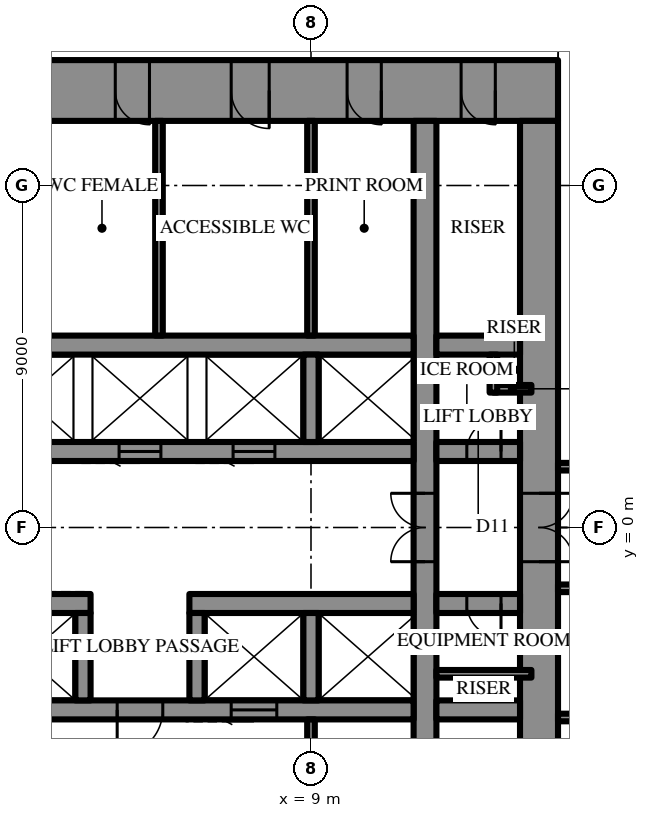
"""IFC4 building model, lengths in metres.
Left out: names, types, materials, properties, quantities, classifications, styles, units other than length and angle.
Written with IfcOpenShell. Run it as: python <this file> out.ifc"""

import sys

from ifc_helpers import new_model, si_unit, direction, frame, frame_2d, origin, place, context, subcontext, project, spatial, rectangle, extrude, element, fill, save


model = new_model("IFC4")
c1 = context("Model", 3, precision=1e-05, world=origin(), true_north=direction((0.0, 1.0)))
c2 = subcontext(c1, "Body", "Model", "MODEL_VIEW")
j1 = project(units=[si_unit("LENGTHUNIT", "METRE"), si_unit("PLANEANGLEUNIT", "RADIAN")], contexts=[c1])
p1 = place(None, origin())
s1 = spatial("IfcSite", under=j1, at=p1, CompositionType="ELEMENT")
p2 = place(p1, origin())
s2 = spatial("IfcBuilding", under=s1, at=p2, CompositionType="ELEMENT")
p3 = place(p2, frame((0.0, 0.0, 232.3)))
s3 = spatial("IfcBuildingStorey", under=s2, at=p3, CompositionType="ELEMENT", Elevation=232.3)
p4 = place(p3, frame((-15.5, 11.5, 0.0), z_axis=(0.0, 0.0, 1.0), x_axis=(1.0, 0.0, 0.0)))
e1 = element("IfcWall", 1, at=p4, inside=s3, PredefinedType="SHEAR", context=c2, shape_type="SweptSolid", body=[
    extrude(rectangle(XDim=31.0, YDim=1.6, at=frame_2d((15.5, 0.0))), origin(), (0.0, 0.0, 1.0), 4.2),
])
p5 = place(p4, frame((16.35, 0.0, 0.0)))
e2 = element("IfcOpeningElement", 2, at=p5, cuts=e1, PredefinedType="OPENING", context=c2, shape_type="SweptSolid", body=[
    extrude(rectangle(XDim=0.9, YDim=2.2, at=frame_2d((0.45, 1.1))), frame((0.0, 0.81, 0.0), z_axis=(0.0, -1.0, 0.0), x_axis=(1.0, 0.0, 0.0)), (0.0, 0.0, 1.0), 1.62),
])
p6 = place(p4, frame((19.35, 0.0, 0.0)))
e3 = element("IfcOpeningElement", 3, at=p6, cuts=e1, PredefinedType="OPENING", context=c2, shape_type="SweptSolid", body=[
    extrude(rectangle(XDim=0.9, YDim=2.2, at=frame_2d((0.45, 1.1))), frame((0.0, 0.81, 0.0), z_axis=(0.0, -1.0, 0.0), x_axis=(1.0, 0.0, 0.0)), (0.0, 0.0, 1.0), 1.62),
])
p7 = place(p4, frame((22.4, 0.0, 0.0)))
e4 = element("IfcOpeningElement", 4, at=p7, cuts=e1, PredefinedType="OPENING", context=c2, shape_type="SweptSolid", body=[
    extrude(rectangle(XDim=1.0, YDim=2.2, at=frame_2d((0.5, 1.1))), frame((0.0, 0.81, 0.0), z_axis=(0.0, -1.0, 0.0), x_axis=(1.0, 0.0, 0.0)), (0.0, 0.0, 1.0), 1.62),
])
p8 = place(p4, frame((1.65, 0.0, 0.0)))
e5 = element("IfcOpeningElement", 5, at=p8, cuts=e1, PredefinedType="OPENING", context=c2, shape_type="SweptSolid", body=[
    extrude(rectangle(XDim=0.9, YDim=2.2, at=frame_2d((0.45, 1.1))), frame((0.0, 0.81, 0.0), z_axis=(0.0, -1.0, 0.0), x_axis=(1.0, 0.0, 0.0)), (0.0, 0.0, 1.0), 1.62),
])
p9 = place(p4, frame((4.65, 0.0, 0.0)))
e6 = element("IfcOpeningElement", 6, at=p9, cuts=e1, PredefinedType="OPENING", context=c2, shape_type="SweptSolid", body=[
    extrude(rectangle(XDim=0.9, YDim=2.2, at=frame_2d((0.45, 1.1))), frame((0.0, 0.81, 0.0), z_axis=(0.0, -1.0, 0.0), x_axis=(1.0, 0.0, 0.0)), (0.0, 0.0, 1.0), 1.62),
])
p10 = place(p4, frame((25.45, 0.0, 0.0)))
e7 = element("IfcOpeningElement", 7, at=p10, cuts=e1, PredefinedType="OPENING", context=c2, shape_type="SweptSolid", body=[
    extrude(rectangle(XDim=0.9, YDim=2.2, at=frame_2d((0.45, 1.1))), frame((0.0, 0.81, 0.0), z_axis=(0.0, -1.0, 0.0), x_axis=(1.0, 0.0, 0.0)), (0.0, 0.0, 1.0), 1.62),
])
p11 = place(p4, frame((28.45, 0.0, 0.0)))
e8 = element("IfcOpeningElement", 8, at=p11, cuts=e1, PredefinedType="OPENING", context=c2, shape_type="SweptSolid", body=[
    extrude(rectangle(XDim=0.9, YDim=2.2, at=frame_2d((0.45, 1.1))), frame((0.0, 0.81, 0.0), z_axis=(0.0, -1.0, 0.0), x_axis=(1.0, 0.0, 0.0)), (0.0, 0.0, 1.0), 1.62),
])
p12 = place(p3, frame((15.0, -10.7, 0.0), z_axis=(0.0, 0.0, 1.0), x_axis=(0.0, 1.0, 0.0)))
e9 = element("IfcWall", 9, at=p12, inside=s3, PredefinedType="SHEAR", context=c2, shape_type="SweptSolid", body=[
    extrude(rectangle(XDim=21.4, YDim=1.0, at=frame_2d((10.7, 0.0))), origin(), (0.0, 0.0, 1.0), 4.2),
])
p13 = place(p12, frame((9.8, 0.0, 0.0)))
e10 = element("IfcOpeningElement", 10, at=p13, cuts=e9, PredefinedType="OPENING", context=c2, shape_type="SweptSolid", body=[
    extrude(rectangle(XDim=1.8, YDim=2.4, at=frame_2d((0.9, 1.2))), frame((0.0, 0.51, 0.0), z_axis=(0.0, -1.0, 0.0), x_axis=(1.0, 0.0, 0.0)), (0.0, 0.0, 1.0), 1.02),
])
p14 = place(p3, frame((12.0, -10.7, 0.0), z_axis=(0.0, 0.0, 1.0), x_axis=(0.0, 1.0, 0.0)))
e11 = element("IfcWall", 11, at=p14, inside=s3, PredefinedType="SHEAR", context=c2, shape_type="SweptSolid", body=[
    extrude(rectangle(XDim=21.4, YDim=0.6, at=frame_2d((10.7, 0.0))), origin(), (0.0, 0.0, 1.0), 4.2),
])
p15 = place(p14, frame((9.8, 0.0, 0.0)))
e12 = element("IfcOpeningElement", 12, at=p15, cuts=e11, PredefinedType="OPENING", context=c2, shape_type="SweptSolid", body=[
    extrude(rectangle(XDim=1.8, YDim=2.4, at=frame_2d((0.9, 1.2))), frame((0.0, 0.31, 0.0), z_axis=(0.0, -1.0, 0.0), x_axis=(1.0, 0.0, 0.0)), (0.0, 0.0, 1.0), 0.62),
])
p16 = place(p3, frame((-3.2, 2.0, 0.0), z_axis=(0.0, 0.0, 1.0), x_axis=(1.0, 0.0, 0.0)))
e13 = element("IfcWall", 13, at=p16, inside=s3, PredefinedType="SHEAR", context=c2, shape_type="SweptSolid", body=[
    extrude(rectangle(XDim=14.9, YDim=0.5, at=frame_2d((7.45, 0.0))), origin(), (0.0, 0.0, 1.0), 4.2),
])
p17 = place(p16, frame((1.15, 0.0, 0.0)))
e14 = element("IfcOpeningElement", 14, at=p17, cuts=e13, PredefinedType="OPENING", context=c2, shape_type="SweptSolid", body=[
    extrude(rectangle(XDim=1.1, YDim=2.2, at=frame_2d((0.55, 1.1))), frame((0.0, 0.26, 0.0), z_axis=(0.0, -1.0, 0.0), x_axis=(1.0, 0.0, 0.0)), (0.0, 0.0, 1.0), 0.52),
])
p18 = place(p16, frame((4.15, 0.0, 0.0)))
e15 = element("IfcOpeningElement", 15, at=p18, cuts=e13, PredefinedType="OPENING", context=c2, shape_type="SweptSolid", body=[
    extrude(rectangle(XDim=1.1, YDim=2.2, at=frame_2d((0.55, 1.1))), frame((0.0, 0.26, 0.0), z_axis=(0.0, -1.0, 0.0), x_axis=(1.0, 0.0, 0.0)), (0.0, 0.0, 1.0), 0.52),
])
p19 = place(p16, frame((7.15, 0.0, 0.0)))
e16 = element("IfcOpeningElement", 16, at=p19, cuts=e13, PredefinedType="OPENING", context=c2, shape_type="SweptSolid", body=[
    extrude(rectangle(XDim=1.1, YDim=2.2, at=frame_2d((0.55, 1.1))), frame((0.0, 0.26, 0.0), z_axis=(0.0, -1.0, 0.0), x_axis=(1.0, 0.0, 0.0)), (0.0, 0.0, 1.0), 0.52),
])
p20 = place(p16, frame((10.15, 0.0, 0.0)))
e17 = element("IfcOpeningElement", 17, at=p20, cuts=e13, PredefinedType="OPENING", context=c2, shape_type="SweptSolid", body=[
    extrude(rectangle(XDim=1.1, YDim=2.2, at=frame_2d((0.55, 1.1))), frame((0.0, 0.26, 0.0), z_axis=(0.0, -1.0, 0.0), x_axis=(1.0, 0.0, 0.0)), (0.0, 0.0, 1.0), 0.52),
])
p21 = place(p3, frame((12.3, 2.0, 0.0), z_axis=(0.0, 0.0, 1.0), x_axis=(1.0, 0.0, 0.0)))
e18 = element("IfcWall", 18, at=p21, inside=s3, PredefinedType="SHEAR", context=c2, shape_type="SweptSolid", body=[
    extrude(rectangle(XDim=2.2, YDim=0.5, at=frame_2d((1.1, 0.0))), origin(), (0.0, 0.0, 1.0), 4.2),
])
p22 = place(p21, frame((0.8, 0.0, 0.0)))
e19 = element("IfcOpeningElement", 19, at=p22, cuts=e18, PredefinedType="OPENING", context=c2, shape_type="SweptSolid", body=[
    extrude(rectangle(XDim=0.9, YDim=2.2, at=frame_2d((0.45, 1.1))), frame((0.0, 0.26, 0.0), z_axis=(0.0, -1.0, 0.0), x_axis=(1.0, 0.0, 0.0)), (0.0, 0.0, 1.0), 0.52),
])
p23 = place(p3, frame((-11.7, 4.8, 0.0), z_axis=(0.0, 0.0, 1.0), x_axis=(1.0, 0.0, 0.0)))
e20 = element("IfcWall", 20, at=p23, inside=s3, PredefinedType="SHEAR", context=c2, shape_type="SweptSolid", body=[
    extrude(rectangle(XDim=23.4, YDim=0.5, at=frame_2d((11.7, 0.0))), origin(), (0.0, 0.0, 1.0), 4.2),
])
p24 = place(p23, frame((6.6, 0.0, 0.0)))
e21 = element("IfcOpeningElement", 21, at=p24, cuts=e20, PredefinedType="OPENING", context=c2, shape_type="SweptSolid", body=[
    extrude(rectangle(XDim=1.2, YDim=2.2, at=frame_2d((0.6, 1.1))), frame((0.0, 0.26, 0.0), z_axis=(0.0, -1.0, 0.0), x_axis=(1.0, 0.0, 0.0)), (0.0, 0.0, 1.0), 0.52),
])
p25 = place(p23, frame((3.6, 0.0, 0.0)))
e22 = element("IfcOpeningElement", 22, at=p25, cuts=e20, PredefinedType="OPENING", context=c2, shape_type="SweptSolid", body=[
    extrude(rectangle(XDim=1.2, YDim=2.2, at=frame_2d((0.6, 1.1))), frame((0.0, 0.26, 0.0), z_axis=(0.0, -1.0, 0.0), x_axis=(1.0, 0.0, 0.0)), (0.0, 0.0, 1.0), 0.52),
])
p26 = place(p3, frame((12.3, 4.8, 0.0), z_axis=(0.0, 0.0, 1.0), x_axis=(1.0, 0.0, 0.0)))
e23 = element("IfcWall", 23, at=p26, inside=s3, PredefinedType="SHEAR", context=c2, shape_type="SweptSolid", body=[
    extrude(rectangle(XDim=2.2, YDim=0.5, at=frame_2d((1.1, 0.0))), origin(), (0.0, 0.0, 1.0), 4.2),
])
p27 = place(p3, frame((9.0, 2.25, 0.0), z_axis=(0.0, 0.0, 1.0), x_axis=(0.0, 1.0, 0.0)))
e24 = element("IfcWall", 24, at=p27, inside=s3, PredefinedType="SHEAR", context=c2, shape_type="SweptSolid", body=[
    extrude(rectangle(XDim=2.3, YDim=0.4, at=frame_2d((1.15, 0.0))), origin(), (0.0, 0.0, 1.0), 4.2),
])
p28 = place(p3, frame((14.5, -2.0, 0.0), z_axis=(0.0, 0.0, 1.0), x_axis=(-1.0, 0.0, 0.0)))
e25 = element("IfcWall", 25, at=p28, inside=s3, PredefinedType="SHEAR", context=c2, shape_type="SweptSolid", body=[
    extrude(rectangle(XDim=2.2, YDim=0.5, at=frame_2d((1.1, 0.0))), origin(), (0.0, 0.0, 1.0), 4.2),
])
p29 = place(p28, frame((0.5, 0.0, 0.0)))
e26 = element("IfcOpeningElement", 26, at=p29, cuts=e25, PredefinedType="OPENING", context=c2, shape_type="SweptSolid", body=[
    extrude(rectangle(XDim=0.9, YDim=2.2, at=frame_2d((0.45, 1.1))), frame((0.0, 0.26, 0.0), z_axis=(0.0, -1.0, 0.0), x_axis=(1.0, 0.0, 0.0)), (0.0, 0.0, 1.0), 0.52),
])
p30 = place(p3, frame((11.7, -2.0, 0.0), z_axis=(0.0, 0.0, 1.0), x_axis=(-1.0, 0.0, 0.0)))
e27 = element("IfcWall", 27, at=p30, inside=s3, PredefinedType="SHEAR", context=c2, shape_type="SweptSolid", body=[
    extrude(rectangle(XDim=5.9, YDim=0.5, at=frame_2d((2.95, 0.0))), origin(), (0.0, 0.0, 1.0), 4.2),
])
p31 = place(p3, frame((3.2, -2.0, 0.0), z_axis=(0.0, 0.0, 1.0), x_axis=(-1.0, 0.0, 0.0)))
e28 = element("IfcWall", 28, at=p31, inside=s3, PredefinedType="SHEAR", context=c2, shape_type="SweptSolid", body=[
    extrude(rectangle(XDim=14.9, YDim=0.5, at=frame_2d((7.45, 0.0))), origin(), (0.0, 0.0, 1.0), 4.2),
])
p32 = place(p31, frame((1.15, 0.0, 0.0)))
e29 = element("IfcOpeningElement", 29, at=p32, cuts=e28, PredefinedType="OPENING", context=c2, shape_type="SweptSolid", body=[
    extrude(rectangle(XDim=1.1, YDim=2.2, at=frame_2d((0.55, 1.1))), frame((0.0, 0.26, 0.0), z_axis=(0.0, -1.0, 0.0), x_axis=(1.0, 0.0, 0.0)), (0.0, 0.0, 1.0), 0.52),
])
p33 = place(p31, frame((4.15, 0.0, 0.0)))
e30 = element("IfcOpeningElement", 30, at=p33, cuts=e28, PredefinedType="OPENING", context=c2, shape_type="SweptSolid", body=[
    extrude(rectangle(XDim=1.1, YDim=2.2, at=frame_2d((0.55, 1.1))), frame((0.0, 0.26, 0.0), z_axis=(0.0, -1.0, 0.0), x_axis=(1.0, 0.0, 0.0)), (0.0, 0.0, 1.0), 0.52),
])
p34 = place(p31, frame((7.15, 0.0, 0.0)))
e31 = element("IfcOpeningElement", 31, at=p34, cuts=e28, PredefinedType="OPENING", context=c2, shape_type="SweptSolid", body=[
    extrude(rectangle(XDim=1.1, YDim=2.2, at=frame_2d((0.55, 1.1))), frame((0.0, 0.26, 0.0), z_axis=(0.0, -1.0, 0.0), x_axis=(1.0, 0.0, 0.0)), (0.0, 0.0, 1.0), 0.52),
])
p35 = place(p31, frame((10.15, 0.0, 0.0)))
e32 = element("IfcOpeningElement", 32, at=p35, cuts=e28, PredefinedType="OPENING", context=c2, shape_type="SweptSolid", body=[
    extrude(rectangle(XDim=1.1, YDim=2.2, at=frame_2d((0.55, 1.1))), frame((0.0, 0.26, 0.0), z_axis=(0.0, -1.0, 0.0), x_axis=(1.0, 0.0, 0.0)), (0.0, 0.0, 1.0), 0.52),
])
p36 = place(p3, frame((14.5, -4.8, 0.0), z_axis=(0.0, 0.0, 1.0), x_axis=(-1.0, 0.0, 0.0)))
e33 = element("IfcWall", 33, at=p36, inside=s3, PredefinedType="SHEAR", context=c2, shape_type="SweptSolid", body=[
    extrude(rectangle(XDim=2.2, YDim=0.5, at=frame_2d((1.1, 0.0))), origin(), (0.0, 0.0, 1.0), 4.2),
])
p37 = place(p3, frame((11.7, -4.8, 0.0), z_axis=(0.0, 0.0, 1.0), x_axis=(-1.0, 0.0, 0.0)))
e34 = element("IfcWall", 34, at=p37, inside=s3, PredefinedType="SHEAR", context=c2, shape_type="SweptSolid", body=[
    extrude(rectangle(XDim=23.4, YDim=0.5, at=frame_2d((11.7, 0.0))), origin(), (0.0, 0.0, 1.0), 4.2),
])
p38 = place(p37, frame((6.6, 0.0, 0.0)))
e35 = element("IfcOpeningElement", 35, at=p38, cuts=e34, PredefinedType="OPENING", context=c2, shape_type="SweptSolid", body=[
    extrude(rectangle(XDim=1.2, YDim=2.2, at=frame_2d((0.6, 1.1))), frame((0.0, 0.26, 0.0), z_axis=(0.0, -1.0, 0.0), x_axis=(1.0, 0.0, 0.0)), (0.0, 0.0, 1.0), 0.52),
])
p39 = place(p37, frame((3.6, 0.0, 0.0)))
e36 = element("IfcOpeningElement", 36, at=p39, cuts=e34, PredefinedType="OPENING", context=c2, shape_type="SweptSolid", body=[
    extrude(rectangle(XDim=1.2, YDim=2.2, at=frame_2d((0.6, 1.1))), frame((0.0, 0.26, 0.0), z_axis=(0.0, -1.0, 0.0), x_axis=(1.0, 0.0, 0.0)), (0.0, 0.0, 1.0), 0.52),
])
for number, where, z_axis, x_axis in (
    (37, (9.0, -2.25, 0.0), (0.0, 0.0, 1.0), (0.0, -1.0, 0.0)),
    (38, (6.0, -2.25, 0.0), (0.0, 0.0, 1.0), (0.0, -1.0, 0.0)),
    (39, (3.0, -2.25, 0.0), (0.0, 0.0, 1.0), (0.0, -1.0, 0.0)),
):
    element("IfcWall", number, at=place(p3, frame(where, z_axis=z_axis, x_axis=x_axis)), inside=s3, PredefinedType="SHEAR", context=c2, shape_type="SweptSolid", body=[
        extrude(rectangle(XDim=2.3, YDim=0.4, at=frame_2d((1.15, 0.0))), origin(), (0.0, 0.0, 1.0), 4.2),
    ])
for number, where, z_axis, x_axis in (
    (40, (9.0, 5.05, 0.0), (0.0, 0.0, 1.0), (0.0, 1.0, 0.0)),
    (41, (5.0, 5.05, 0.0), (0.0, 0.0, 1.0), (0.0, 1.0, 0.0)),
    (42, (9.0, -5.05, 0.0), (0.0, 0.0, 1.0), (0.0, -1.0, 0.0)),
):
    element("IfcWall", number, at=place(p3, frame(where, z_axis=z_axis, x_axis=x_axis)), inside=s3, PredefinedType="PARTITIONING", context=c2, shape_type="SweptSolid", body=[
        extrude(rectangle(XDim=5.65, YDim=0.2, at=frame_2d((2.825, 0.0))), origin(), (0.0, 0.0, 1.0), 4.0),
    ])
for number, where, z_axis, x_axis in (
    (43, (13.8, 3.65, 0.0), (0.0, 0.0, 1.0), (1.0, 0.0, 0.0)),
    (44, (13.8, 3.55, 0.0), (0.0, 0.0, 1.0), (0.0, 1.0, 0.0)),
):
    element("IfcWall", number, at=place(p3, frame(where, z_axis=z_axis, x_axis=x_axis)), inside=s3, PredefinedType="PARTITIONING", context=c2, shape_type="SweptSolid", body=[
        extrude(rectangle(XDim=1.0, YDim=0.2, at=frame_2d((0.5, 0.0))), origin(), (0.0, 0.0, 1.0), 4.0),
    ])
p40 = place(p3, frame((14.8, -3.85, 0.0), z_axis=(0.0, 0.0, 1.0), x_axis=(-1.0, 0.0, 0.0)))
e45 = element("IfcWall", 45, at=p40, inside=s3, PredefinedType="PARTITIONING", context=c2, shape_type="SweptSolid", body=[
    extrude(rectangle(XDim=2.5, YDim=0.2, at=frame_2d((1.25, 0.0))), origin(), (0.0, 0.0, 1.0), 4.0),
])
p41 = place(p3, frame((15.5, 1.6, 0.0), z_axis=(0.0, 0.0, 1.0), x_axis=(1.0, 0.0, 0.0)))
e46 = element("IfcWall", 46, at=p41, inside=s3, PredefinedType="PARTITIONING", context=c2, shape_type="SweptSolid", body=[
    extrude(rectangle(XDim=11.7, YDim=0.2, at=frame_2d((5.85, 0.0))), origin(), (0.0, 0.0, 1.0), 4.0),
])
p42 = place(p41, frame((3.01, 0.0, 0.0)))
e47 = element("IfcOpeningElement", 47, at=p42, cuts=e46, PredefinedType="OPENING", context=c2, shape_type="SweptSolid", body=[
    extrude(rectangle(XDim=1.0, YDim=2.2, at=frame_2d((0.5, 1.1))), frame((0.0, 0.11, 0.0), z_axis=(0.0, -1.0, 0.0), x_axis=(1.0, 0.0, 0.0)), (0.0, 0.0, 1.0), 0.22),
])
p43 = place(p3, frame((15.5, -1.6, 0.0), z_axis=(0.0, 0.0, 1.0), x_axis=(1.0, 0.0, 0.0)))
e48 = element("IfcWall", 48, at=p43, inside=s3, PredefinedType="PARTITIONING", context=c2, shape_type="SweptSolid", body=[
    extrude(rectangle(XDim=11.7, YDim=0.2, at=frame_2d((5.85, 0.0))), origin(), (0.0, 0.0, 1.0), 4.0),
])
p44 = place(p43, frame((3.01, 0.0, 0.0)))
e49 = element("IfcOpeningElement", 49, at=p44, cuts=e48, PredefinedType="OPENING", context=c2, shape_type="SweptSolid", body=[
    extrude(rectangle(XDim=1.0, YDim=2.2, at=frame_2d((0.5, 1.1))), frame((0.0, 0.11, 0.0), z_axis=(0.0, -1.0, 0.0), x_axis=(1.0, 0.0, 0.0)), (0.0, 0.0, 1.0), 0.22),
])
p45 = place(p3, frame((15.5, -5.0, 0.0), z_axis=(0.0, 0.0, 1.0), x_axis=(1.0, 0.0, 0.0)))
e50 = element("IfcWall", 50, at=p45, inside=s3, PredefinedType="PARTITIONING", context=c2, shape_type="SweptSolid", body=[
    extrude(rectangle(XDim=14.845, YDim=0.2, at=frame_2d((7.423, 0.0))), origin(), (0.0, 0.0, 1.0), 4.0),
])
p46 = place(p45, frame((0.985, 0.0, 0.0)))
e51 = element("IfcOpeningElement", 51, at=p46, cuts=e50, PredefinedType="OPENING", context=c2, shape_type="SweptSolid", body=[
    extrude(rectangle(XDim=1.0, YDim=2.2, at=frame_2d((0.5, 1.1))), frame((0.0, 0.11, 0.0), z_axis=(0.0, -1.0, 0.0), x_axis=(1.0, 0.0, 0.0)), (0.0, 0.0, 1.0), 0.22),
])
p47 = place(p13, frame((1.8, 0.0, 0.0), z_axis=(0.0, 0.0, 1.0), x_axis=(-1.0, 0.0, 0.0)))
e52 = element("IfcDoor", 52, at=p47, inside=s3, OperationType="DOUBLE_DOOR_SINGLE_SWING", PredefinedType="DOOR", context=c2, shape_type="SweptSolid", body=[
    extrude(rectangle(XDim=1.8, YDim=2.4, at=frame_2d((0.9, 1.2))), frame((0.0, 0.025, 0.0), z_axis=(0.0, -1.0, 0.0), x_axis=(1.0, 0.0, 0.0)), (0.0, 0.0, 1.0), 0.05),
])
fill(e10, e52)
p48 = place(p6, frame((0.9, 0.0, 0.0), z_axis=(0.0, 0.0, 1.0), x_axis=(-1.0, 0.0, 0.0)))
e53 = element("IfcDoor", 53, at=p48, inside=s3, OperationType="SINGLE_SWING_RIGHT", PredefinedType="DOOR", context=c2, shape_type="SweptSolid", body=[
    extrude(rectangle(XDim=0.9, YDim=2.2, at=frame_2d((0.45, 1.1))), frame((0.0, 0.025, 0.0), z_axis=(0.0, -1.0, 0.0), x_axis=(1.0, 0.0, 0.0)), (0.0, 0.0, 1.0), 0.05),
])
fill(e3, e53)
p49 = place(p7, frame((1.0, 0.0, 0.0), z_axis=(0.0, 0.0, 1.0), x_axis=(-1.0, 0.0, 0.0)))
e54 = element("IfcDoor", 54, at=p49, inside=s3, OperationType="SINGLE_SWING_RIGHT", PredefinedType="DOOR", context=c2, shape_type="SweptSolid", body=[
    extrude(rectangle(XDim=1.0, YDim=2.2, at=frame_2d((0.5, 1.1))), frame((0.0, 0.025, 0.0), z_axis=(0.0, -1.0, 0.0), x_axis=(1.0, 0.0, 0.0)), (0.0, 0.0, 1.0), 0.05),
])
fill(e4, e54)
p50 = place(p10, frame((0.9, 0.0, 0.0), z_axis=(0.0, 0.0, 1.0), x_axis=(-1.0, 0.0, 0.0)))
e55 = element("IfcDoor", 55, at=p50, inside=s3, OperationType="SINGLE_SWING_RIGHT", PredefinedType="DOOR", context=c2, shape_type="SweptSolid", body=[
    extrude(rectangle(XDim=0.9, YDim=2.2, at=frame_2d((0.45, 1.1))), frame((0.0, 0.025, 0.0), z_axis=(0.0, -1.0, 0.0), x_axis=(1.0, 0.0, 0.0)), (0.0, 0.0, 1.0), 0.05),
])
fill(e7, e55)
p51 = place(p11, frame((0.9, 0.0, 0.0), z_axis=(0.0, 0.0, 1.0), x_axis=(-1.0, 0.0, 0.0)))
e56 = element("IfcDoor", 56, at=p51, inside=s3, OperationType="SINGLE_SWING_RIGHT", PredefinedType="DOOR", context=c2, shape_type="SweptSolid", body=[
    extrude(rectangle(XDim=0.9, YDim=2.2, at=frame_2d((0.45, 1.1))), frame((0.0, 0.025, 0.0), z_axis=(0.0, -1.0, 0.0), x_axis=(1.0, 0.0, 0.0)), (0.0, 0.0, 1.0), 0.05),
])
fill(e8, e56)
p52 = place(p38, origin())
e57 = element("IfcDoor", 57, at=p52, inside=s3, OperationType="SINGLE_SWING_LEFT", PredefinedType="DOOR", context=c2, shape_type="SweptSolid", body=[
    extrude(rectangle(XDim=1.2, YDim=2.2, at=frame_2d((0.6, 1.1))), frame((0.0, 0.025, 0.0), z_axis=(0.0, -1.0, 0.0), x_axis=(1.0, 0.0, 0.0)), (0.0, 0.0, 1.0), 0.05),
])
fill(e35, e57)
p53 = place(p22, origin())
e58 = element("IfcDoor", 58, at=p53, inside=s3, OperationType="SINGLE_SWING_LEFT", PredefinedType="DOOR", context=c2, shape_type="SweptSolid", body=[
    extrude(rectangle(XDim=0.9, YDim=2.2, at=frame_2d((0.45, 1.1))), frame((0.0, 0.025, 0.0), z_axis=(0.0, -1.0, 0.0), x_axis=(1.0, 0.0, 0.0)), (0.0, 0.0, 1.0), 0.05),
])
fill(e19, e58)
p54 = place(p29, origin())
e59 = element("IfcDoor", 59, at=p54, inside=s3, OperationType="SINGLE_SWING_RIGHT", PredefinedType="DOOR", context=c2, shape_type="SweptSolid", body=[
    extrude(rectangle(XDim=0.9, YDim=2.2, at=frame_2d((0.45, 1.1))), frame((0.0, 0.025, 0.0), z_axis=(0.0, -1.0, 0.0), x_axis=(1.0, 0.0, 0.0)), (0.0, 0.0, 1.0), 0.05),
])
fill(e26, e59)
p55 = place(p15, origin())
e60 = element("IfcDoor", 60, at=p55, inside=s3, OperationType="DOUBLE_DOOR_SINGLE_SWING", PredefinedType="DOOR", context=c2, shape_type="SweptSolid", body=[
    extrude(rectangle(XDim=1.8, YDim=2.4, at=frame_2d((0.9, 1.2))), frame((0.0, 0.025, 0.0), z_axis=(0.0, -1.0, 0.0), x_axis=(1.0, 0.0, 0.0)), (0.0, 0.0, 1.0), 0.05),
])
fill(e12, e60)
p56 = place(p19, frame((1.1, 0.0, 0.0), z_axis=(0.0, 0.0, 1.0), x_axis=(-1.0, 0.0, 0.0)))
e61 = element("IfcDoor", 61, at=p56, inside=s3, OperationType="SLIDING_TO_LEFT", PredefinedType="DOOR", context=c2, shape_type="SweptSolid", body=[
    extrude(rectangle(XDim=1.1, YDim=2.2, at=frame_2d((0.55, 1.1))), frame((0.0, 0.025, 0.0), z_axis=(0.0, -1.0, 0.0), x_axis=(1.0, 0.0, 0.0)), (0.0, 0.0, 1.0), 0.05),
])
fill(e16, e61)
p57 = place(p20, frame((1.1, 0.0, 0.0), z_axis=(0.0, 0.0, 1.0), x_axis=(-1.0, 0.0, 0.0)))
e62 = element("IfcDoor", 62, at=p57, inside=s3, OperationType="SLIDING_TO_LEFT", PredefinedType="DOOR", context=c2, shape_type="SweptSolid", body=[
    extrude(rectangle(XDim=1.1, YDim=2.2, at=frame_2d((0.55, 1.1))), frame((0.0, 0.025, 0.0), z_axis=(0.0, -1.0, 0.0), x_axis=(1.0, 0.0, 0.0)), (0.0, 0.0, 1.0), 0.05),
])
fill(e17, e62)
p58 = place(p39, origin())
e63 = element("IfcDoor", 63, at=p58, inside=s3, OperationType="SLIDING_TO_LEFT", PredefinedType="DOOR", context=c2, shape_type="SweptSolid", body=[
    extrude(rectangle(XDim=1.2, YDim=2.2, at=frame_2d((0.6, 1.1))), frame((0.0, 0.025, 0.0), z_axis=(0.0, -1.0, 0.0), x_axis=(1.0, 0.0, 0.0)), (0.0, 0.0, 1.0), 0.05),
])
fill(e36, e63)
save(model, sys.argv[1])
